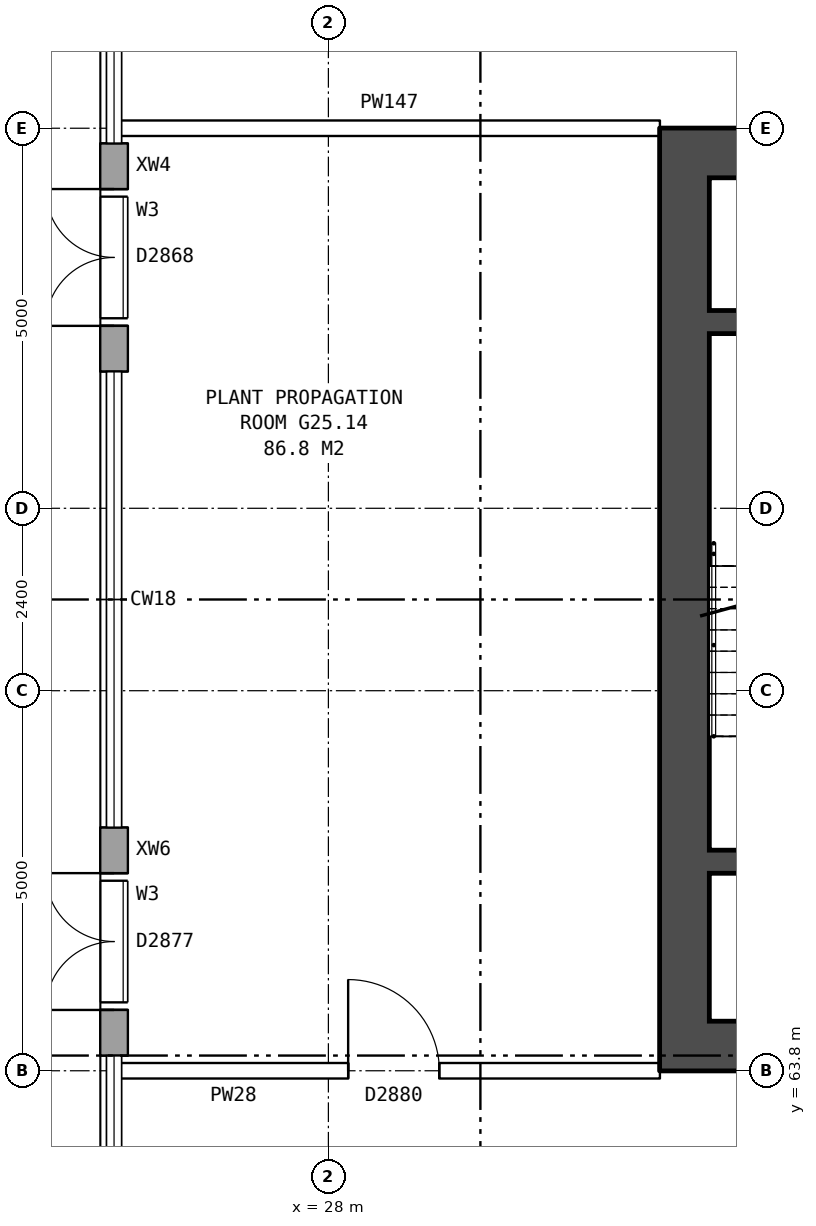
"""IFC4 building model, lengths in metres.
Left out: names, types, materials, properties, quantities, classifications, styles, units other than length and angle.
Written with IfcOpenShell. Run it as: python <this file> out.ifc"""

import sys

from ifc_helpers import new_model, si_unit, direction, frame, frame_2d, origin, place, context, subcontext, project, spatial, rectangle, extrude, element, fill, save


model = new_model("IFC4")
c1 = context("Model", 3, precision=1e-05, world=origin(), true_north=direction((0.0, 1.0)))
c2 = subcontext(c1, "Body", "Model", "MODEL_VIEW")
j1 = project(units=[si_unit("LENGTHUNIT", "METRE"), si_unit("PLANEANGLEUNIT", "RADIAN")], contexts=[c1])
p1 = place(None, origin())
s1 = spatial("IfcSite", under=j1, at=p1, CompositionType="ELEMENT")
p2 = place(p1, origin())
s2 = spatial("IfcBuilding", under=s1, at=p2, CompositionType="ELEMENT")
p3 = place(p2, frame((0.0, 0.0, 90.2)))
s3 = spatial("IfcBuildingStorey", under=s2, at=p3, CompositionType="ELEMENT", Elevation=90.2)
p4 = place(p3, frame((25.18, 76.0, 0.0), z_axis=(0.0, 0.0, 1.0), x_axis=(0.0, -1.0, 0.0)))
e1 = element("IfcWall", 1, at=p4, inside=s3, PredefinedType="STANDARD", context=c2, shape_type="SweptSolid", body=[
    extrude(rectangle(XDim=3.0, YDim=0.36, at=frame_2d((1.5, 0.0))), origin(), (0.0, 0.0, 1.0), 5.6),
])
p5 = place(p4, frame((0.7, 0.0, 3.4)))
e2 = element("IfcOpeningElement", 2, at=p5, cuts=e1, PredefinedType="OPENING", context=c2, shape_type="SweptSolid", body=[
    extrude(rectangle(XDim=1.6, YDim=1.2, at=frame_2d((0.8, 0.6))), frame((0.0, 0.19, 0.0), z_axis=(0.0, -1.0, 0.0), x_axis=(1.0, 0.0, 0.0)), (0.0, 0.0, 1.0), 0.38),
])
p6 = place(p4, frame((0.6, 0.0, 0.0)))
e3 = element("IfcOpeningElement", 3, at=p6, cuts=e1, PredefinedType="OPENING", context=c2, shape_type="SweptSolid", body=[
    extrude(rectangle(XDim=1.8, YDim=2.4, at=frame_2d((0.9, 1.2))), frame((0.0, 0.19, 0.0), z_axis=(0.0, -1.0, 0.0), x_axis=(1.0, 0.0, 0.0)), (0.0, 0.0, 1.0), 0.38),
])
p7 = place(p3, frame((25.18, 67.0, 0.0), z_axis=(0.0, 0.0, 1.0), x_axis=(0.0, -1.0, 0.0)))
e4 = element("IfcWall", 4, at=p7, inside=s3, PredefinedType="STANDARD", context=c2, shape_type="SweptSolid", body=[
    extrude(rectangle(XDim=3.0, YDim=0.36, at=frame_2d((1.5, 0.0))), origin(), (0.0, 0.0, 1.0), 5.6),
])
p8 = place(p7, frame((0.7, 0.0, 3.4)))
e5 = element("IfcOpeningElement", 5, at=p8, cuts=e4, PredefinedType="OPENING", context=c2, shape_type="SweptSolid", body=[
    extrude(rectangle(XDim=1.6, YDim=1.2, at=frame_2d((0.8, 0.6))), frame((0.0, 0.19, 0.0), z_axis=(0.0, -1.0, 0.0), x_axis=(1.0, 0.0, 0.0)), (0.0, 0.0, 1.0), 0.38),
])
p9 = place(p7, frame((0.6, 0.0, 0.0)))
e6 = element("IfcOpeningElement", 6, at=p9, cuts=e4, PredefinedType="OPENING", context=c2, shape_type="SweptSolid", body=[
    extrude(rectangle(XDim=1.8, YDim=2.4, at=frame_2d((0.9, 1.2))), frame((0.0, 0.19, 0.0), z_axis=(0.0, -1.0, 0.0), x_axis=(1.0, 0.0, 0.0)), (0.0, 0.0, 1.0), 0.38),
])
p10 = place(p3, frame((32.685, 75.55, 0.0), z_axis=(0.0, 0.0, 1.0), x_axis=(0.0, -1.0, 0.0)))
e7 = element("IfcWall", 7, at=p10, inside=s3, PredefinedType="SHEAR", context=c2, shape_type="SweptSolid", body=[
    extrude(rectangle(XDim=11.1, YDim=0.65, at=frame_2d((5.55, 0.0))), origin(), (0.0, 0.0, 1.0), 5.6),
])
for number, where, z_axis, x_axis in (
    (8, (41.36, 75.875, 0.0), (0.0, 0.0, 1.0), (-1.0, 0.0, 0.0)),
    (9, (41.36, 64.125, 0.0), (0.0, 0.0, 1.0), (-1.0, 0.0, 0.0)),
):
    element("IfcWall", number, at=place(p3, frame(where, z_axis=z_axis, x_axis=x_axis)), inside=s3, PredefinedType="SHEAR", context=c2, shape_type="SweptSolid", body=[
        extrude(rectangle(XDim=9.0, YDim=0.65, at=frame_2d((4.5, 0.0))), origin(), (0.0, 0.0, 1.0), 5.6),
    ])
for number, where, z_axis, x_axis in (
    (10, (36.06, 73.65, 0.0), (0.0, 0.0, 1.0), (-1.0, 0.0, 0.0)),
    (11, (36.06, 66.55, 0.0), (0.0, 0.0, 1.0), (-1.0, 0.0, 0.0)),
):
    element("IfcWall", number, at=place(p3, frame(where, z_axis=z_axis, x_axis=x_axis)), inside=s3, PredefinedType="SHEAR", context=c2, shape_type="SweptSolid", body=[
        extrude(rectangle(XDim=3.05, YDim=0.3, at=frame_2d((1.525, 0.0))), origin(), (0.0, 0.0, 1.0), 5.6),
    ])
p11 = place(p3, frame((25.24, 63.8, 0.0), z_axis=(0.0, 0.0, 1.0), x_axis=(1.0, 0.0, 0.0)))
e12 = element("IfcWall", 12, at=p11, inside=s3, PredefinedType="PARTITIONING", context=c2, shape_type="SweptSolid", body=[
    extrude(rectangle(XDim=7.12, YDim=0.2, at=frame_2d((3.56, 0.0))), origin(), (0.0, 0.0, 1.0), 5.6),
])
p12 = place(p11, frame((3.02, 0.0, 0.0)))
e13 = element("IfcOpeningElement", 13, at=p12, cuts=e12, PredefinedType="OPENING", context=c2, shape_type="SweptSolid", body=[
    extrude(rectangle(XDim=1.2, YDim=2.1, at=frame_2d((0.6, 1.05))), frame((0.0, 0.11, 0.0), z_axis=(0.0, -1.0, 0.0), x_axis=(1.0, 0.0, 0.0)), (0.0, 0.0, 1.0), 0.22),
])
p13 = place(p3, frame((25.24, 76.2, 0.0), z_axis=(0.0, 0.0, 1.0), x_axis=(1.0, 0.0, 0.0)))
e14 = element("IfcWall", 14, at=p13, inside=s3, PredefinedType="PARTITIONING", context=c2, shape_type="SweptSolid", body=[
    extrude(rectangle(XDim=7.12, YDim=0.2, at=frame_2d((3.56, 0.0))), origin(), (0.0, 0.0, 1.0), 5.6),
])
p14 = place(p5, origin())
e15 = element("IfcWindow", 15, at=p14, inside=s3, PartitioningType="DOUBLE_PANEL_HORIZONTAL", PredefinedType="WINDOW", context=c2, shape_type="SweptSolid", body=[
    extrude(rectangle(XDim=1.6, YDim=1.2, at=frame_2d((0.8, 0.6))), frame((0.0, 0.15, 0.0), z_axis=(0.0, -1.0, 0.0), x_axis=(1.0, 0.0, 0.0)), (0.0, 0.0, 1.0), 0.06),
])
fill(e2, e15)
p15 = place(p6, frame((1.8, 0.0, 0.0), z_axis=(0.0, 0.0, 1.0), x_axis=(-1.0, 0.0, 0.0)))
e16 = element("IfcDoor", 16, at=p15, inside=s3, OperationType="DOUBLE_DOOR_SINGLE_SWING", PredefinedType="DOOR", context=c2, shape_type="SweptSolid", body=[
    extrude(rectangle(XDim=1.8, YDim=2.4, at=frame_2d((0.9, 1.2))), frame((0.0, 0.025, 0.0), z_axis=(0.0, -1.0, 0.0), x_axis=(1.0, 0.0, 0.0)), (0.0, 0.0, 1.0), 0.05),
])
fill(e3, e16)
p16 = place(p8, origin())
e17 = element("IfcWindow", 17, at=p16, inside=s3, PartitioningType="DOUBLE_PANEL_HORIZONTAL", PredefinedType="WINDOW", context=c2, shape_type="SweptSolid", body=[
    extrude(rectangle(XDim=1.6, YDim=1.2, at=frame_2d((0.8, 0.6))), frame((0.0, 0.15, 0.0), z_axis=(0.0, -1.0, 0.0), x_axis=(1.0, 0.0, 0.0)), (0.0, 0.0, 1.0), 0.06),
])
fill(e5, e17)
p17 = place(p9, frame((1.8, 0.0, 0.0), z_axis=(0.0, 0.0, 1.0), x_axis=(-1.0, 0.0, 0.0)))
e18 = element("IfcDoor", 18, at=p17, inside=s3, OperationType="DOUBLE_DOOR_SINGLE_SWING", PredefinedType="DOOR", context=c2, shape_type="SweptSolid", body=[
    extrude(rectangle(XDim=1.8, YDim=2.4, at=frame_2d((0.9, 1.2))), frame((0.0, 0.025, 0.0), z_axis=(0.0, -1.0, 0.0), x_axis=(1.0, 0.0, 0.0)), (0.0, 0.0, 1.0), 0.05),
])
fill(e6, e18)
p18 = place(p12, origin())
e19 = element("IfcDoor", 19, at=p18, inside=s3, OperationType="SINGLE_SWING_LEFT", PredefinedType="DOOR", context=c2, shape_type="SweptSolid", body=[
    extrude(rectangle(XDim=1.2, YDim=2.1, at=frame_2d((0.6, 1.05))), frame((0.0, 0.025, 0.0), z_axis=(0.0, -1.0, 0.0), x_axis=(1.0, 0.0, 0.0)), (0.0, 0.0, 1.0), 0.05),
])
fill(e13, e19)
save(model, sys.argv[1])
